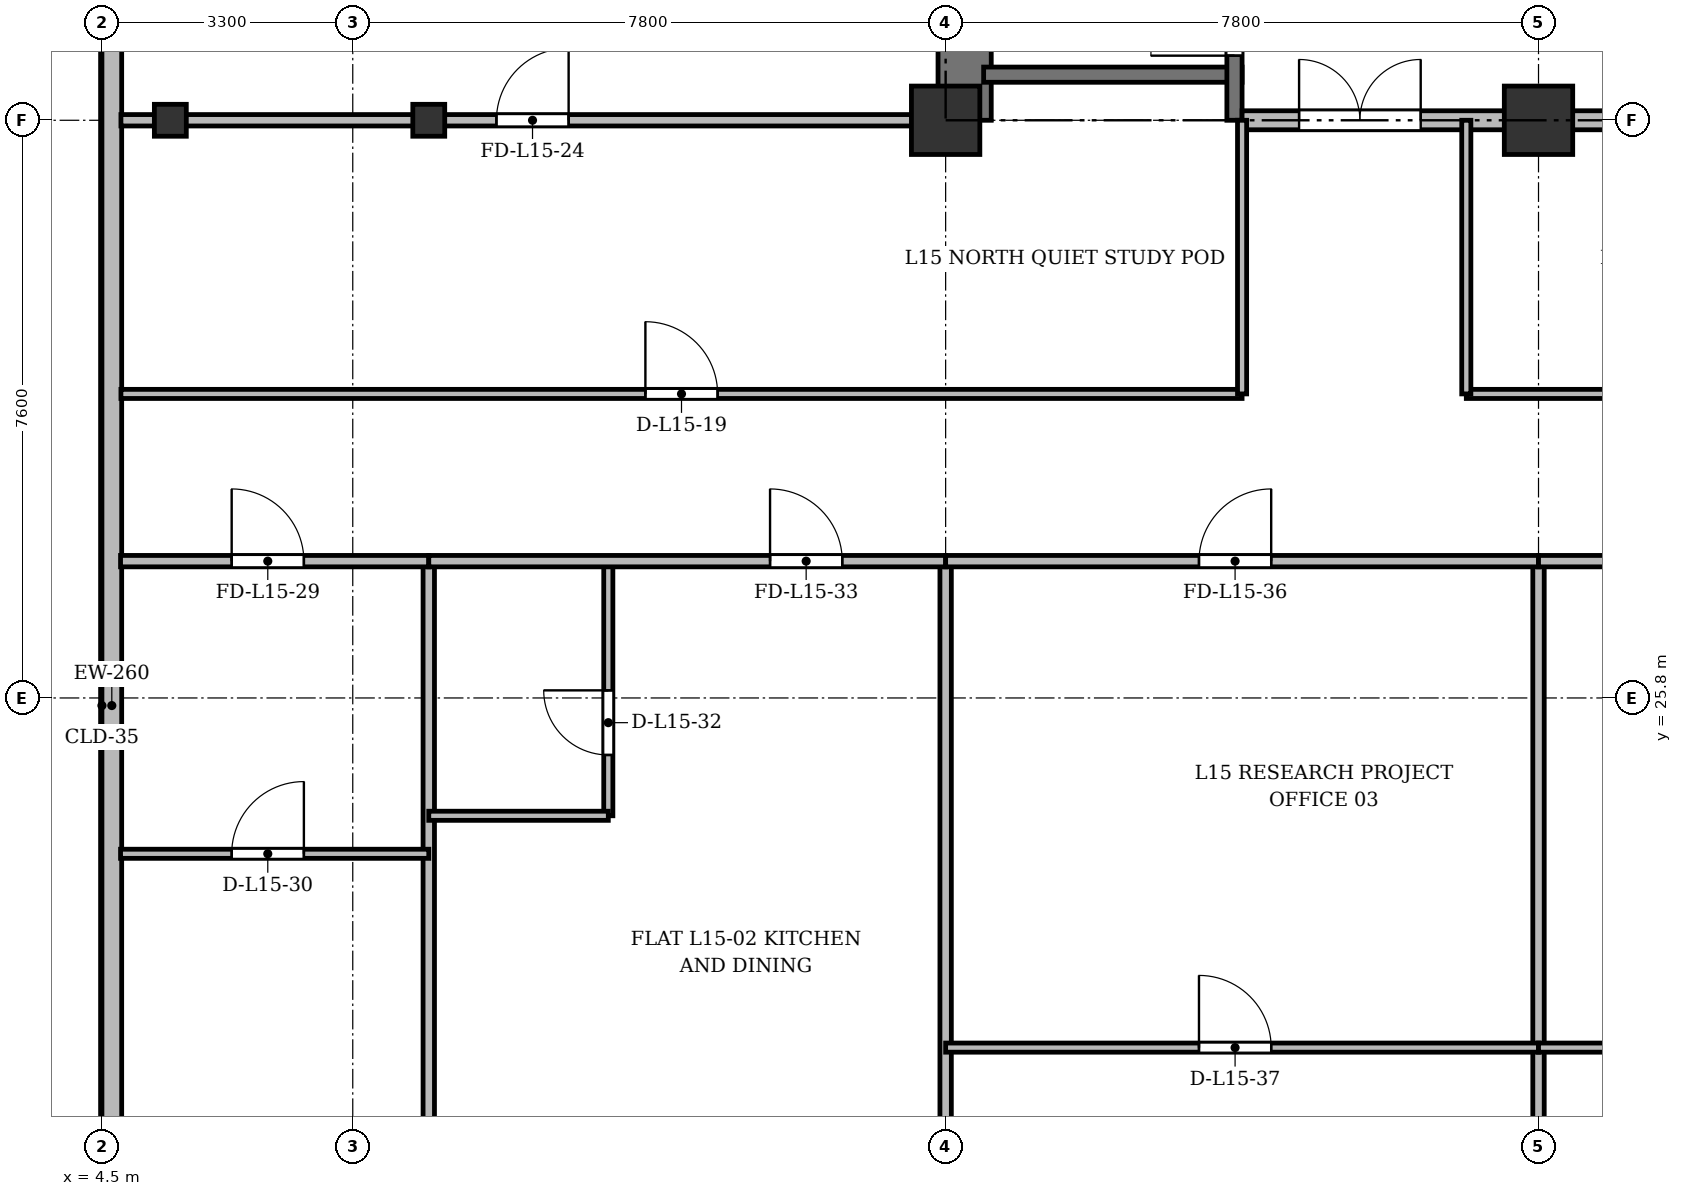
"""IFC4 building model, lengths in metres.
Left out: names, types, materials, properties, quantities, classifications, styles, units other than length and angle.
Written with IfcOpenShell. Run it as: python <this file> out.ifc"""

import sys

from ifc_helpers import new_model, si_unit, direction, frame, frame_2d, origin, origin_2d, place, context, subcontext, project, spatial, rectangle, i_section, extrude, source, transform, mapped, element, fill, save


model = new_model("IFC4")
c1 = context("Model", 3, precision=1e-05, world=origin(), true_north=direction((0.0, 1.0)))
c2 = subcontext(c1, "Body", "Model", "MODEL_VIEW")
j1 = project(units=[si_unit("LENGTHUNIT", "METRE"), si_unit("PLANEANGLEUNIT", "RADIAN")], contexts=[c1])
p1 = place(None, origin())
s1 = spatial("IfcSite", under=j1, at=p1, CompositionType="ELEMENT")
p2 = place(p1, origin())
s2 = spatial("IfcBuilding", under=s1, at=p2, CompositionType="ELEMENT")
p3 = place(p2, frame((0.0, 0.0, 59.5)))
s3 = spatial("IfcBuildingStorey", under=s2, at=p3, CompositionType="ELEMENT", Elevation=59.5)
m1 = source(origin(), c2, "Body", "SweptSolid", [
    extrude(i_section(OverallWidth=0.42, OverallDepth=0.42, WebThickness=0.026, FlangeThickness=0.04, at=origin_2d()), origin(), (0.0, 0.0, 1.0), 3.6),
])
for number, where, z_axis, x_axis in (
    (1, (5.4, 33.4, 0.0), (0.0, 0.0, 1.0), (1.0, 0.0, 0.0)),
    (2, (8.8, 33.4, 0.0), (0.0, 0.0, 1.0), (1.0, 0.0, 0.0)),
):
    element("IfcColumn", number, at=place(p3, frame(where, z_axis=z_axis, x_axis=x_axis)), inside=s3, PredefinedType="COLUMN", context=c2, shape_type="MappedRepresentation", body=[
        mapped(m1, transform((0.0, 0.0, 0.0), x_axis=(1.0, 0.0, 0.0), y_axis=(0.0, 1.0, 0.0), z_axis=(0.0, 0.0, 1.0), scale=1.0)),
    ])
m2 = source(origin(), c2, "Body", "SweptSolid", [
    extrude(rectangle(XDim=0.9, YDim=0.9, at=origin_2d()), origin(), (0.0, 0.0, 1.0), 3.6),
])
for number, where, z_axis, x_axis in (
    (3, (15.6, 33.4, 0.0), (0.0, 0.0, 1.0), (1.0, 0.0, 0.0)),
    (4, (23.4, 33.4, 0.0), (0.0, 0.0, 1.0), (1.0, 0.0, 0.0)),
):
    element("IfcColumn", number, at=place(p3, frame(where, z_axis=z_axis, x_axis=x_axis)), inside=s3, PredefinedType="COLUMN", context=c2, shape_type="MappedRepresentation", body=[
        mapped(m2, transform((0.0, 0.0, 0.0), x_axis=(1.0, 0.0, 0.0), y_axis=(0.0, 1.0, 0.0), z_axis=(0.0, 0.0, 1.0), scale=1.0)),
    ])
p4 = place(p3, frame((4.63, 5.9, 0.0), z_axis=(0.0, 0.0, 1.0), x_axis=(0.0, 1.0, 0.0)))
e5 = element("IfcWall", 5, at=p4, inside=s3, PredefinedType="SOLIDWALL", context=c2, shape_type="SweptSolid", body=[
    extrude(rectangle(XDim=39.6, YDim=0.26, at=frame_2d((19.8, 0.0))), origin(), (0.0, 0.0, 1.0), 3.34),
])
p5 = place(p4, frame((1.45, 0.0, 0.92)))
e6 = element("IfcOpeningElement", 6, at=p5, cuts=e5, PredefinedType="OPENING", context=c2, shape_type="SweptSolid", body=[
    extrude(rectangle(XDim=1.2, YDim=1.65, at=frame_2d((0.6, 0.825))), frame((0.0, 0.14, 0.0), z_axis=(0.0, -1.0, 0.0), x_axis=(1.0, 0.0, 0.0)), (0.0, 0.0, 1.0), 0.28),
])
p6 = place(p4, frame((4.3, 0.0, 0.92)))
e7 = element("IfcOpeningElement", 7, at=p6, cuts=e5, PredefinedType="OPENING", context=c2, shape_type="SweptSolid", body=[
    extrude(rectangle(XDim=2.4, YDim=2.1, at=frame_2d((1.2, 1.05))), frame((0.0, 0.14, 0.0), z_axis=(0.0, -1.0, 0.0), x_axis=(1.0, 0.0, 0.0)), (0.0, 0.0, 1.0), 0.28),
])
p7 = place(p4, frame((8.5, 0.0, 0.92)))
e8 = element("IfcOpeningElement", 8, at=p7, cuts=e5, PredefinedType="OPENING", context=c2, shape_type="SweptSolid", body=[
    extrude(rectangle(XDim=2.4, YDim=2.1, at=frame_2d((1.2, 1.05))), frame((0.0, 0.14, 0.0), z_axis=(0.0, -1.0, 0.0), x_axis=(1.0, 0.0, 0.0)), (0.0, 0.0, 1.0), 0.28),
])
p8 = place(p4, frame((29.7, 0.0, 0.92)))
e9 = element("IfcOpeningElement", 9, at=p8, cuts=e5, PredefinedType="OPENING", context=c2, shape_type="SweptSolid", body=[
    extrude(rectangle(XDim=2.4, YDim=2.1, at=frame_2d((1.2, 1.05))), frame((0.0, 0.14, 0.0), z_axis=(0.0, -1.0, 0.0), x_axis=(1.0, 0.0, 0.0)), (0.0, 0.0, 1.0), 0.28),
])
p9 = place(p4, frame((33.9, 0.0, 0.92)))
e10 = element("IfcOpeningElement", 10, at=p9, cuts=e5, PredefinedType="OPENING", context=c2, shape_type="SweptSolid", body=[
    extrude(rectangle(XDim=1.2, YDim=1.65, at=frame_2d((0.6, 0.825))), frame((0.0, 0.14, 0.0), z_axis=(0.0, -1.0, 0.0), x_axis=(1.0, 0.0, 0.0)), (0.0, 0.0, 1.0), 0.28),
])
p10 = place(p4, frame((37.25, 0.0, 0.92)))
e11 = element("IfcOpeningElement", 11, at=p10, cuts=e5, PredefinedType="OPENING", context=c2, shape_type="SweptSolid", body=[
    extrude(rectangle(XDim=1.2, YDim=1.65, at=frame_2d((0.6, 0.825))), frame((0.0, 0.14, 0.0), z_axis=(0.0, -1.0, 0.0), x_axis=(1.0, 0.0, 0.0)), (0.0, 0.0, 1.0), 0.28),
])
p11 = place(p3, frame((15.85, 33.4, 0.0), z_axis=(0.0, 0.0, 1.0), x_axis=(0.0, 1.0, 0.0)))
e12 = element("IfcWall", 12, at=p11, inside=s3, PredefinedType="SHEAR", context=c2, shape_type="SweptSolid", body=[
    extrude(rectangle(XDim=11.7, YDim=0.7, at=frame_2d((5.85, 0.0))), origin(), (0.0, 0.0, 1.0), 3.34),
])
p12 = place(p3, frame((16.1, 34.0, 0.0), z_axis=(0.0, 0.0, 1.0), x_axis=(1.0, 0.0, 0.0)))
e13 = element("IfcWall", 13, at=p12, inside=s3, PredefinedType="SHEAR", context=c2, shape_type="SweptSolid", body=[
    extrude(rectangle(XDim=3.4, YDim=0.2, at=frame_2d((1.7, 0.0))), origin(), (0.0, 0.0, 1.0), 3.34),
])
p13 = place(p3, frame((19.4, 33.4, 0.0), z_axis=(0.0, 0.0, 1.0), x_axis=(0.0, 1.0, 0.0)))
e14 = element("IfcWall", 14, at=p13, inside=s3, PredefinedType="SHEAR", context=c2, shape_type="SweptSolid", body=[
    extrude(rectangle(XDim=11.1, YDim=0.2, at=frame_2d((5.55, 0.0))), origin(), (0.0, 0.0, 1.0), 3.34),
])
p14 = place(p13, frame((0.85, 0.0, 0.0)))
e15 = element("IfcOpeningElement", 15, at=p14, cuts=e14, PredefinedType="OPENING", context=c2, shape_type="SweptSolid", body=[
    extrude(rectangle(XDim=1.1, YDim=2.15, at=frame_2d((0.55, 1.075))), frame((0.0, 0.11, 0.0), z_axis=(0.0, -1.0, 0.0), x_axis=(1.0, 0.0, 0.0)), (0.0, 0.0, 1.0), 0.22),
])
p15 = place(p3, frame((19.5, 33.4, 0.0), z_axis=(0.0, 0.0, 1.0), x_axis=(1.0, 0.0, 0.0)))
e16 = element("IfcWall", 16, at=p15, inside=s3, PredefinedType="PARTITIONING", context=c2, shape_type="SweptSolid", body=[
    extrude(rectangle(XDim=6.8, YDim=0.25, at=frame_2d((3.4, 0.0))), origin(), (0.0, 0.0, 1.0), 2.69),
])
p16 = place(p15, frame((0.75, 0.0, 0.0)))
e17 = element("IfcOpeningElement", 17, at=p16, cuts=e16, PredefinedType="OPENING", context=c2, shape_type="SweptSolid", body=[
    extrude(rectangle(XDim=1.6, YDim=2.2, at=frame_2d((0.8, 1.1))), frame((0.0, 0.135, 0.0), z_axis=(0.0, -1.0, 0.0), x_axis=(1.0, 0.0, 0.0)), (0.0, 0.0, 1.0), 0.27),
])
p17 = place(p3, frame((4.75, 29.8, 0.0), z_axis=(0.0, 0.0, 1.0), x_axis=(1.0, 0.0, 0.0)))
e18 = element("IfcWall", 18, at=p17, inside=s3, PredefinedType="PARTITIONING", context=c2, shape_type="SweptSolid", body=[
    extrude(rectangle(XDim=14.75, YDim=0.12, at=frame_2d((7.375, 0.0))), origin(), (0.0, 0.0, 1.0), 2.752),
])
p18 = place(p17, frame((6.9, 0.0, 0.0)))
e19 = element("IfcOpeningElement", 19, at=p18, cuts=e18, PredefinedType="OPENING", context=c2, shape_type="SweptSolid", body=[
    extrude(rectangle(XDim=0.95, YDim=2.15, at=frame_2d((0.475, 1.075))), frame((0.0, 0.07, 0.0), z_axis=(0.0, -1.0, 0.0), x_axis=(1.0, 0.0, 0.0)), (0.0, 0.0, 1.0), 0.14),
])
p19 = place(p3, frame((22.45, 29.8, 0.0), z_axis=(0.0, 0.0, 1.0), x_axis=(1.0, 0.0, 0.0)))
e20 = element("IfcWall", 20, at=p19, inside=s3, PredefinedType="PARTITIONING", context=c2, shape_type="SweptSolid", body=[
    extrude(rectangle(XDim=11.75, YDim=0.12, at=frame_2d((5.875, 0.0))), origin(), (0.0, 0.0, 1.0), 2.752),
])
p20 = place(p19, frame((4.944, 0.0, 0.0)))
e21 = element("IfcOpeningElement", 21, at=p20, cuts=e20, PredefinedType="OPENING", context=c2, shape_type="SweptSolid", body=[
    extrude(rectangle(XDim=0.95, YDim=2.15, at=frame_2d((0.475, 1.075))), frame((0.0, 0.07, 0.0), z_axis=(0.0, -1.0, 0.0), x_axis=(1.0, 0.0, 0.0)), (0.0, 0.0, 1.0), 0.14),
])
for number, where, z_axis, x_axis in (
    (22, (19.5, 29.8, 0.0), (0.0, 0.0, 1.0), (0.0, 1.0, 0.0)),
    (23, (22.45, 29.8, 0.0), (0.0, 0.0, 1.0), (0.0, 1.0, 0.0)),
):
    element("IfcWall", number, at=place(p3, frame(where, z_axis=z_axis, x_axis=x_axis)), inside=s3, PredefinedType="PARTITIONING", context=c2, shape_type="SweptSolid", body=[
        extrude(rectangle(XDim=3.6, YDim=0.12, at=frame_2d((1.8, 0.0))), origin(), (0.0, 0.0, 1.0), 2.69),
    ])
p21 = place(p3, frame((4.75, 33.4, 0.0), z_axis=(0.0, 0.0, 1.0), x_axis=(1.0, 0.0, 0.0)))
e24 = element("IfcWall", 24, at=p21, inside=s3, PredefinedType="PARTITIONING", context=c2, shape_type="SweptSolid", body=[
    extrude(rectangle(XDim=10.85, YDim=0.15, at=frame_2d((5.425, 0.0))), origin(), (0.0, 0.0, 1.0), 2.69),
])
p22 = place(p21, frame((4.94, 0.0, 0.0)))
e25 = element("IfcOpeningElement", 25, at=p22, cuts=e24, PredefinedType="OPENING", context=c2, shape_type="SweptSolid", body=[
    extrude(rectangle(XDim=0.95, YDim=2.15, at=frame_2d((0.475, 1.075))), frame((0.0, 0.085, 0.0), z_axis=(0.0, -1.0, 0.0), x_axis=(1.0, 0.0, 0.0)), (0.0, 0.0, 1.0), 0.17),
])
for number, where, z_axis, x_axis in (
    (26, (8.8, 3.145, 0.0), (0.0, 0.0, 1.0), (0.0, 1.0, 0.0)),
    (27, (15.6, 3.145, 0.0), (0.0, 0.0, 1.0), (0.0, 1.0, 0.0)),
    (28, (23.4, 3.145, 0.0), (0.0, 0.0, 1.0), (0.0, 1.0, 0.0)),
):
    element("IfcWall", number, at=place(p3, frame(where, z_axis=z_axis, x_axis=x_axis)), inside=s3, PredefinedType="PARTITIONING", context=c2, shape_type="SweptSolid", body=[
        extrude(rectangle(XDim=24.455, YDim=0.15, at=frame_2d((12.228, 0.0))), origin(), (0.0, 0.0, 1.0), 2.752),
    ])
p23 = place(p3, frame((4.745, 27.6, 0.0), z_axis=(0.0, 0.0, 1.0), x_axis=(1.0, 0.0, 0.0)))
e29 = element("IfcWall", 29, at=p23, inside=s3, PredefinedType="PARTITIONING", context=c2, shape_type="SweptSolid", body=[
    extrude(rectangle(XDim=4.055, YDim=0.15, at=frame_2d((2.027, 0.0))), origin(), (0.0, 0.0, 1.0), 2.752),
])
p24 = place(p23, frame((1.462, 0.0, 0.0)))
e30 = element("IfcOpeningElement", 30, at=p24, cuts=e29, PredefinedType="OPENING", context=c2, shape_type="SweptSolid", body=[
    extrude(rectangle(XDim=0.95, YDim=2.15, at=frame_2d((0.475, 1.075))), frame((0.0, 0.085, 0.0), z_axis=(0.0, -1.0, 0.0), x_axis=(1.0, 0.0, 0.0)), (0.0, 0.0, 1.0), 0.17),
])
p25 = place(p3, frame((4.745, 23.75, 0.0), z_axis=(0.0, 0.0, 1.0), x_axis=(1.0, 0.0, 0.0)))
e31 = element("IfcWall", 31, at=p25, inside=s3, PredefinedType="PARTITIONING", context=c2, shape_type="SweptSolid", body=[
    extrude(rectangle(XDim=4.055, YDim=0.12, at=frame_2d((2.027, 0.0))), origin(), (0.0, 0.0, 1.0), 2.752),
])
p26 = place(p25, frame((1.462, 0.0, 0.0)))
e32 = element("IfcOpeningElement", 32, at=p26, cuts=e31, PredefinedType="OPENING", context=c2, shape_type="SweptSolid", body=[
    extrude(rectangle(XDim=0.95, YDim=2.15, at=frame_2d((0.475, 1.075))), frame((0.0, 0.07, 0.0), z_axis=(0.0, -1.0, 0.0), x_axis=(1.0, 0.0, 0.0)), (0.0, 0.0, 1.0), 0.14),
])
p27 = place(p3, frame((11.162, 24.25, 0.0), z_axis=(0.0, 0.0, 1.0), x_axis=(0.0, 1.0, 0.0)))
e33 = element("IfcWall", 33, at=p27, inside=s3, PredefinedType="PARTITIONING", context=c2, shape_type="SweptSolid", body=[
    extrude(rectangle(XDim=3.35, YDim=0.12, at=frame_2d((1.675, 0.0))), origin(), (0.0, 0.0, 1.0), 2.94),
])
p28 = place(p27, frame((0.8, 0.0, 0.0)))
e34 = element("IfcOpeningElement", 34, at=p28, cuts=e33, PredefinedType="OPENING", context=c2, shape_type="SweptSolid", body=[
    extrude(rectangle(XDim=0.85, YDim=2.1, at=frame_2d((0.425, 1.05))), frame((0.0, 0.07, 0.0), z_axis=(0.0, -1.0, 0.0), x_axis=(1.0, 0.0, 0.0)), (0.0, 0.0, 1.0), 0.14),
])
p29 = place(p3, frame((8.8, 24.25, 0.0), z_axis=(0.0, 0.0, 1.0), x_axis=(1.0, 0.0, 0.0)))
e35 = element("IfcWall", 35, at=p29, inside=s3, PredefinedType="PARTITIONING", context=c2, shape_type="SweptSolid", body=[
    extrude(rectangle(XDim=2.362, YDim=0.12, at=frame_2d((1.181, 0.0))), origin(), (0.0, 0.0, 1.0), 2.752),
])
p30 = place(p3, frame((8.8, 27.6, 0.0), z_axis=(0.0, 0.0, 1.0), x_axis=(1.0, 0.0, 0.0)))
e36 = element("IfcWall", 36, at=p30, inside=s3, PredefinedType="PARTITIONING", context=c2, shape_type="SweptSolid", body=[
    extrude(rectangle(XDim=6.8, YDim=0.15, at=frame_2d((3.4, 0.0))), origin(), (0.0, 0.0, 1.0), 2.752),
])
p31 = place(p30, frame((4.49, 0.0, 0.0)))
e37 = element("IfcOpeningElement", 37, at=p31, cuts=e36, PredefinedType="OPENING", context=c2, shape_type="SweptSolid", body=[
    extrude(rectangle(XDim=0.95, YDim=2.15, at=frame_2d((0.475, 1.075))), frame((0.0, 0.085, 0.0), z_axis=(0.0, -1.0, 0.0), x_axis=(1.0, 0.0, 0.0)), (0.0, 0.0, 1.0), 0.17),
])
p32 = place(p3, frame((15.6, 27.6, 0.0), z_axis=(0.0, 0.0, 1.0), x_axis=(1.0, 0.0, 0.0)))
e38 = element("IfcWall", 38, at=p32, inside=s3, PredefinedType="PARTITIONING", context=c2, shape_type="SweptSolid", body=[
    extrude(rectangle(XDim=7.8, YDim=0.15, at=frame_2d((3.9, 0.0))), origin(), (0.0, 0.0, 1.0), 2.752),
])
p33 = place(p32, frame((3.333, 0.0, 0.0)))
e39 = element("IfcOpeningElement", 39, at=p33, cuts=e38, PredefinedType="OPENING", context=c2, shape_type="SweptSolid", body=[
    extrude(rectangle(XDim=0.95, YDim=2.15, at=frame_2d((0.475, 1.075))), frame((0.0, 0.085, 0.0), z_axis=(0.0, -1.0, 0.0), x_axis=(1.0, 0.0, 0.0)), (0.0, 0.0, 1.0), 0.17),
])
p34 = place(p3, frame((15.6, 21.2, 0.0), z_axis=(0.0, 0.0, 1.0), x_axis=(1.0, 0.0, 0.0)))
e40 = element("IfcWall", 40, at=p34, inside=s3, PredefinedType="PARTITIONING", context=c2, shape_type="SweptSolid", body=[
    extrude(rectangle(XDim=7.8, YDim=0.12, at=frame_2d((3.9, 0.0))), origin(), (0.0, 0.0, 1.0), 2.752),
])
p35 = place(p34, frame((3.333, 0.0, 0.0)))
e41 = element("IfcOpeningElement", 41, at=p35, cuts=e40, PredefinedType="OPENING", context=c2, shape_type="SweptSolid", body=[
    extrude(rectangle(XDim=0.95, YDim=2.15, at=frame_2d((0.475, 1.075))), frame((0.0, 0.07, 0.0), z_axis=(0.0, -1.0, 0.0), x_axis=(1.0, 0.0, 0.0)), (0.0, 0.0, 1.0), 0.14),
])
p36 = place(p3, frame((23.4, 27.6, 0.0), z_axis=(0.0, 0.0, 1.0), x_axis=(1.0, 0.0, 0.0)))
e42 = element("IfcWall", 42, at=p36, inside=s3, PredefinedType="PARTITIONING", context=c2, shape_type="SweptSolid", body=[
    extrude(rectangle(XDim=7.2, YDim=0.15, at=frame_2d((3.6, 0.0))), origin(), (0.0, 0.0, 1.0), 2.752),
])
p37 = place(p36, frame((3.125, 0.0, 0.0)))
e43 = element("IfcOpeningElement", 43, at=p37, cuts=e42, PredefinedType="OPENING", context=c2, shape_type="SweptSolid", body=[
    extrude(rectangle(XDim=0.95, YDim=2.15, at=frame_2d((0.475, 1.075))), frame((0.0, 0.085, 0.0), z_axis=(0.0, -1.0, 0.0), x_axis=(1.0, 0.0, 0.0)), (0.0, 0.0, 1.0), 0.17),
])
p38 = place(p3, frame((23.4, 21.2, 0.0), z_axis=(0.0, 0.0, 1.0), x_axis=(1.0, 0.0, 0.0)))
e44 = element("IfcWall", 44, at=p38, inside=s3, PredefinedType="PARTITIONING", context=c2, shape_type="SweptSolid", body=[
    extrude(rectangle(XDim=7.2, YDim=0.12, at=frame_2d((3.6, 0.0))), origin(), (0.0, 0.0, 1.0), 2.752),
])
p39 = place(p38, frame((3.125, 0.0, 0.0)))
e45 = element("IfcOpeningElement", 45, at=p39, cuts=e44, PredefinedType="OPENING", context=c2, shape_type="SweptSolid", body=[
    extrude(rectangle(XDim=0.95, YDim=2.15, at=frame_2d((0.475, 1.075))), frame((0.0, 0.07, 0.0), z_axis=(0.0, -1.0, 0.0), x_axis=(1.0, 0.0, 0.0)), (0.0, 0.0, 1.0), 0.14),
])
m3 = source(origin(), c2, "Body", "SweptSolid", [
    extrude(rectangle(XDim=1.1, YDim=2.15, at=frame_2d((0.55, 1.075))), frame((0.0, 0.025, 0.0), z_axis=(0.0, -1.0, 0.0), x_axis=(1.0, 0.0, 0.0)), (0.0, 0.0, 1.0), 0.05),
])
p40 = place(p14, origin())
e46 = element("IfcDoor", 46, at=p40, inside=s3, OperationType="SINGLE_SWING_LEFT", PredefinedType="DOOR", context=c2, shape_type="MappedRepresentation", body=[
    mapped(m3, transform((0.0, 0.0, 0.0), x_axis=(1.0, 0.0, 0.0), y_axis=(0.0, 1.0, 0.0), z_axis=(0.0, 0.0, 1.0), scale=1.0)),
])
fill(e15, e46)
m4 = source(origin(), c2, "Body", "SweptSolid", [
    extrude(rectangle(XDim=1.6, YDim=2.2, at=frame_2d((0.8, 1.1))), frame((0.0, 0.025, 0.0), z_axis=(0.0, -1.0, 0.0), x_axis=(1.0, 0.0, 0.0)), (0.0, 0.0, 1.0), 0.05),
])
p41 = place(p16, origin())
e47 = element("IfcDoor", 47, at=p41, inside=s3, OperationType="DOUBLE_DOOR_SINGLE_SWING", PredefinedType="DOOR", context=c2, shape_type="MappedRepresentation", body=[
    mapped(m4, transform((0.0, 0.0, 0.0), x_axis=(1.0, 0.0, 0.0), y_axis=(0.0, 1.0, 0.0), z_axis=(0.0, 0.0, 1.0), scale=1.0)),
])
fill(e17, e47)
m5 = source(origin(), c2, "Body", "SweptSolid", [
    extrude(rectangle(XDim=0.95, YDim=2.15, at=frame_2d((0.475, 1.075))), frame((0.0, 0.025, 0.0), z_axis=(0.0, -1.0, 0.0), x_axis=(1.0, 0.0, 0.0)), (0.0, 0.0, 1.0), 0.05),
])
p42 = place(p18, origin())
e48 = element("IfcDoor", 48, at=p42, inside=s3, OperationType="SINGLE_SWING_LEFT", PredefinedType="DOOR", context=c2, shape_type="MappedRepresentation", body=[
    mapped(m5, transform((0.0, 0.0, 0.0), x_axis=(1.0, 0.0, 0.0), y_axis=(0.0, 1.0, 0.0), z_axis=(0.0, 0.0, 1.0), scale=1.0)),
])
fill(e19, e48)
p43 = place(p22, origin())
e49 = element("IfcDoor", 49, at=p43, inside=s3, OperationType="SINGLE_SWING_RIGHT", PredefinedType="DOOR", context=c2, shape_type="MappedRepresentation", body=[
    mapped(m5, transform((0.0, 0.0, 0.0), x_axis=(1.0, 0.0, 0.0), y_axis=(0.0, 1.0, 0.0), z_axis=(0.0, 0.0, 1.0), scale=1.0)),
])
fill(e25, e49)
p44 = place(p24, origin())
e50 = element("IfcDoor", 50, at=p44, inside=s3, OperationType="SINGLE_SWING_LEFT", PredefinedType="DOOR", context=c2, shape_type="MappedRepresentation", body=[
    mapped(m5, transform((0.0, 0.0, 0.0), x_axis=(1.0, 0.0, 0.0), y_axis=(0.0, 1.0, 0.0), z_axis=(0.0, 0.0, 1.0), scale=1.0)),
])
fill(e30, e50)
p45 = place(p26, origin())
e51 = element("IfcDoor", 51, at=p45, inside=s3, OperationType="SINGLE_SWING_RIGHT", PredefinedType="DOOR", context=c2, shape_type="MappedRepresentation", body=[
    mapped(m5, transform((0.0, 0.0, 0.0), x_axis=(1.0, 0.0, 0.0), y_axis=(0.0, 1.0, 0.0), z_axis=(0.0, 0.0, 1.0), scale=1.0)),
])
fill(e32, e51)
m6 = source(origin(), c2, "Body", "SweptSolid", [
    extrude(rectangle(XDim=0.85, YDim=2.1, at=frame_2d((0.425, 1.05))), frame((0.0, 0.025, 0.0), z_axis=(0.0, -1.0, 0.0), x_axis=(1.0, 0.0, 0.0)), (0.0, 0.0, 1.0), 0.05),
])
p46 = place(p28, origin())
e52 = element("IfcDoor", 52, at=p46, inside=s3, OperationType="SINGLE_SWING_RIGHT", PredefinedType="DOOR", context=c2, shape_type="MappedRepresentation", body=[
    mapped(m6, transform((0.0, 0.0, 0.0), x_axis=(1.0, 0.0, 0.0), y_axis=(0.0, 1.0, 0.0), z_axis=(0.0, 0.0, 1.0), scale=1.0)),
])
fill(e34, e52)
p47 = place(p31, origin())
e53 = element("IfcDoor", 53, at=p47, inside=s3, OperationType="SINGLE_SWING_LEFT", PredefinedType="DOOR", context=c2, shape_type="MappedRepresentation", body=[
    mapped(m5, transform((0.0, 0.0, 0.0), x_axis=(1.0, 0.0, 0.0), y_axis=(0.0, 1.0, 0.0), z_axis=(0.0, 0.0, 1.0), scale=1.0)),
])
fill(e37, e53)
p48 = place(p33, origin())
e54 = element("IfcDoor", 54, at=p48, inside=s3, OperationType="SINGLE_SWING_RIGHT", PredefinedType="DOOR", context=c2, shape_type="MappedRepresentation", body=[
    mapped(m5, transform((0.0, 0.0, 0.0), x_axis=(1.0, 0.0, 0.0), y_axis=(0.0, 1.0, 0.0), z_axis=(0.0, 0.0, 1.0), scale=1.0)),
])
fill(e39, e54)
p49 = place(p35, origin())
e55 = element("IfcDoor", 55, at=p49, inside=s3, OperationType="SINGLE_SWING_LEFT", PredefinedType="DOOR", context=c2, shape_type="MappedRepresentation", body=[
    mapped(m5, transform((0.0, 0.0, 0.0), x_axis=(1.0, 0.0, 0.0), y_axis=(0.0, 1.0, 0.0), z_axis=(0.0, 0.0, 1.0), scale=1.0)),
])
fill(e41, e55)
save(model, sys.argv[1])
